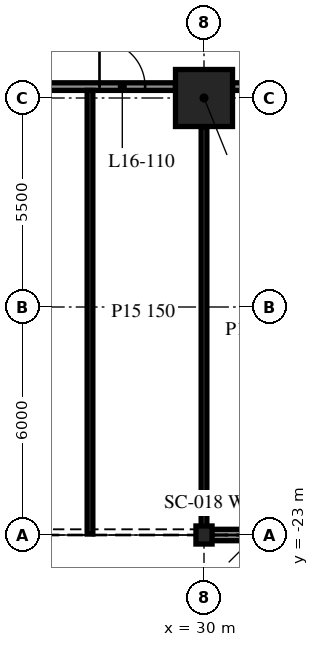
"""IFC4 building model, lengths in metres.
Left out: names, types, materials, properties, quantities, classifications, styles, units other than length and angle.
Written with IfcOpenShell. Run it as: python <this file> out.ifc"""

import sys

from ifc_helpers import new_model, si_unit, direction, frame, frame_2d, origin, origin_2d, place, context, subcontext, project, spatial, rectangle, i_section, extrude, element, fill, save


model = new_model("IFC4")
c1 = context("Model", 3, precision=1e-05, world=origin(), true_north=direction((0.0, 1.0)))
c2 = subcontext(c1, "Body", "Model", "MODEL_VIEW")
j1 = project(units=[si_unit("LENGTHUNIT", "METRE"), si_unit("PLANEANGLEUNIT", "RADIAN")], contexts=[c1])
p1 = place(None, origin())
s1 = spatial("IfcSite", under=j1, at=p1, CompositionType="ELEMENT")
p2 = place(p1, origin())
s2 = spatial("IfcBuilding", under=s1, at=p2, CompositionType="ELEMENT")
p3 = place(p2, frame((0.0, 0.0, 71.8)))
s3 = spatial("IfcBuildingStorey", under=s2, at=p3, CompositionType="ELEMENT", Elevation=71.8)
p4 = place(p3, frame((30.0, -11.5, -0.34), z_axis=(0.0, 0.0, 1.0), x_axis=(1.0, 0.0, 0.0)))
e1 = element("IfcColumn", 1, at=p4, inside=s3, PredefinedType="COLUMN", context=c2, shape_type="SweptSolid", body=[
    extrude(rectangle(XDim=1.5, YDim=1.5, at=origin_2d()), origin(), (0.0, 0.0, 1.0), 4.3),
])
p5 = place(p3, frame((30.0, -23.0, -0.34), z_axis=(0.0, 0.0, 1.0), x_axis=(1.0, 0.0, 0.0)))
e2 = element("IfcColumn", 2, at=p5, inside=s3, PredefinedType="COLUMN", context=c2, shape_type="SweptSolid", body=[
    extrude(i_section(OverallWidth=0.424, OverallDepth=0.475, WebThickness=0.048, FlangeThickness=0.077, at=origin_2d()), origin(), (0.0, 0.0, 1.0), 4.3),
])
p6 = place(p3, frame((30.024, -23.0, 0.0), z_axis=(0.0, 0.0, 1.0), x_axis=(1.0, 0.0, 0.0)))
e3 = element("IfcWall", 3, at=p6, inside=s3, PredefinedType="NOTDEFINED", context=c2, shape_type="SweptSolid", body=[
    extrude(rectangle(XDim=11.952, YDim=0.3, at=frame_2d((5.976, 0.0))), origin(), (0.0, 0.0, 1.0), 3.203),
])
p7 = place(p3, frame((18.75, -11.2, 0.0), z_axis=(0.0, 0.0, 1.0), x_axis=(1.0, 0.0, 0.0)))
e4 = element("IfcWall", 4, at=p7, inside=s3, PredefinedType="PARTITIONING", context=c2, shape_type="SweptSolid", body=[
    extrude(rectangle(XDim=10.5, YDim=0.2, at=frame_2d((5.25, 0.0))), origin(), (0.0, 0.0, 1.0), 3.96),
])
p8 = place(p7, frame((4.7, 0.0, 0.0)))
e5 = element("IfcOpeningElement", 5, at=p8, cuts=e4, PredefinedType="OPENING", context=c2, shape_type="SweptSolid", body=[
    extrude(rectangle(XDim=1.2, YDim=2.1, at=frame_2d((0.6, 1.05))), frame((0.0, 0.11, 0.0), z_axis=(0.0, -1.0, 0.0), x_axis=(1.0, 0.0, 0.0)), (0.0, 0.0, 1.0), 0.22),
])
p9 = place(p7, frame((8.5, 0.0, 0.0)))
e6 = element("IfcOpeningElement", 6, at=p9, cuts=e4, PredefinedType="OPENING", context=c2, shape_type="SweptSolid", body=[
    extrude(rectangle(XDim=1.2, YDim=2.1, at=frame_2d((0.6, 1.05))), frame((0.0, 0.11, 0.0), z_axis=(0.0, -1.0, 0.0), x_axis=(1.0, 0.0, 0.0)), (0.0, 0.0, 1.0), 0.22),
])
p10 = place(p3, frame((30.75, -11.2, 0.0), z_axis=(0.0, 0.0, 1.0), x_axis=(1.0, 0.0, 0.0)))
e7 = element("IfcWall", 7, at=p10, inside=s3, PredefinedType="PARTITIONING", context=c2, shape_type="SweptSolid", body=[
    extrude(rectangle(XDim=10.5, YDim=0.2, at=frame_2d((5.25, 0.0))), origin(), (0.0, 0.0, 1.0), 3.96),
])
p11 = place(p10, frame((4.7, 0.0, 0.0)))
e8 = element("IfcOpeningElement", 8, at=p11, cuts=e7, PredefinedType="OPENING", context=c2, shape_type="SweptSolid", body=[
    extrude(rectangle(XDim=1.2, YDim=2.1, at=frame_2d((0.6, 1.05))), frame((0.0, 0.11, 0.0), z_axis=(0.0, -1.0, 0.0), x_axis=(1.0, 0.0, 0.0)), (0.0, 0.0, 1.0), 0.22),
])
p12 = place(p10, frame((8.5, 0.0, 0.0)))
e9 = element("IfcOpeningElement", 9, at=p12, cuts=e7, PredefinedType="OPENING", context=c2, shape_type="SweptSolid", body=[
    extrude(rectangle(XDim=1.0, YDim=2.1, at=frame_2d((0.5, 1.05))), frame((0.0, 0.11, 0.0), z_axis=(0.0, -1.0, 0.0), x_axis=(1.0, 0.0, 0.0)), (0.0, 0.0, 1.0), 0.22),
])
p13 = place(p3, frame((27.0, -22.975, 0.0), z_axis=(0.0, 0.0, 1.0), x_axis=(0.0, 1.0, 0.0)))
e10 = element("IfcWall", 10, at=p13, inside=s3, PredefinedType="PARTITIONING", context=c2, shape_type="SweptSolid", body=[
    extrude(rectangle(XDim=11.675, YDim=0.15, at=frame_2d((5.837, 0.0))), origin(), (0.0, 0.0, 1.0), 3.96),
])
p14 = place(p3, frame((30.0, -22.975, 0.0), z_axis=(0.0, 0.0, 1.0), x_axis=(0.0, 1.0, 0.0)))
e11 = element("IfcWall", 11, at=p14, inside=s3, PredefinedType="PARTITIONING", context=c2, shape_type="SweptSolid", body=[
    extrude(rectangle(XDim=10.725, YDim=0.15, at=frame_2d((5.363, 0.0))), origin(), (0.0, 0.0, 1.0), 3.96),
])
p15 = place(p9, origin())
e12 = element("IfcDoor", 12, at=p15, inside=s3, OperationType="SINGLE_SWING_LEFT", PredefinedType="DOOR", context=c2, shape_type="SweptSolid", body=[
    extrude(rectangle(XDim=1.2, YDim=2.1, at=frame_2d((0.6, 1.05))), frame((0.0, 0.025, 0.0), z_axis=(0.0, -1.0, 0.0), x_axis=(1.0, 0.0, 0.0)), (0.0, 0.0, 1.0), 0.05),
])
fill(e6, e12)
save(model, sys.argv[1])
